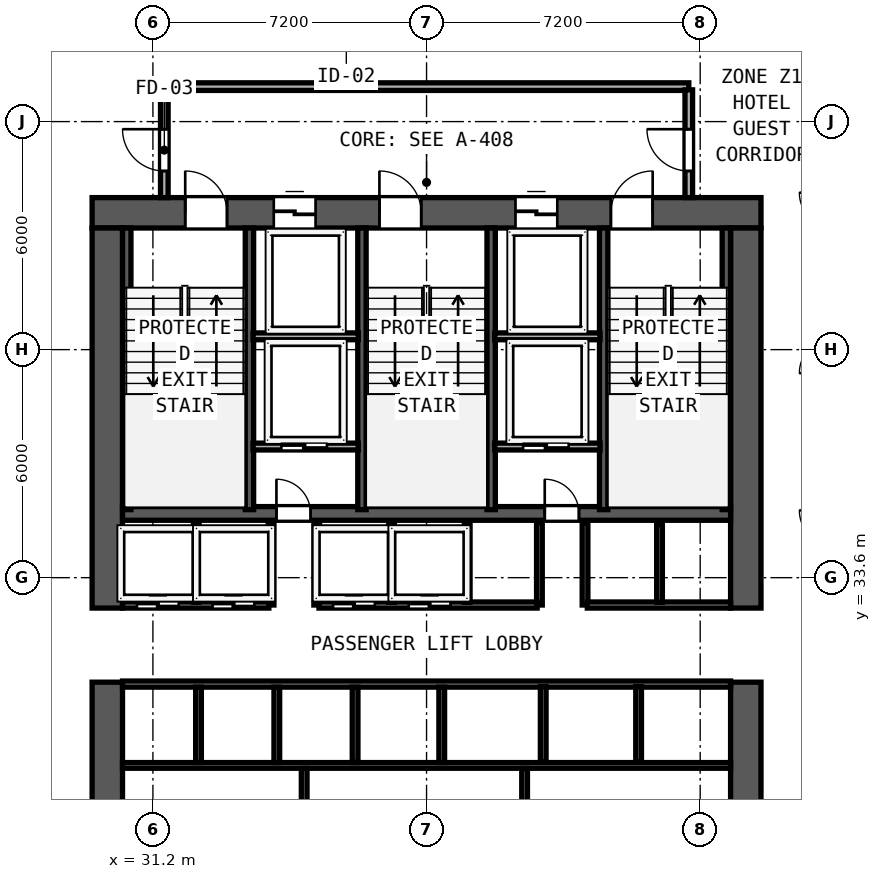
"""IFC4 building model, lengths in metres.
Left out: names, types, materials, properties, quantities, classifications, styles, units other than length and angle.
Written with IfcOpenShell. Run it as: python <this file> out.ifc"""

import sys

from ifc_helpers import new_model, si_unit, direction, frame, frame_2d, origin, place, context, subcontext, project, spatial, rectangle, extrude, element, fill, save


model = new_model("IFC4")
c1 = context("Model", 3, precision=1e-05, world=origin(), true_north=direction((0.0, 1.0)))
c2 = subcontext(c1, "Body", "Model", "MODEL_VIEW")
j1 = project(units=[si_unit("LENGTHUNIT", "METRE"), si_unit("PLANEANGLEUNIT", "RADIAN")], contexts=[c1])
p1 = place(None, origin())
s1 = spatial("IfcSite", under=j1, at=p1, CompositionType="ELEMENT")
p2 = place(p1, origin())
s2 = spatial("IfcBuilding", under=s1, at=p2, CompositionType="ELEMENT")
p3 = place(p2, frame((0.0, 0.0, 39.2)))
s3 = spatial("IfcBuildingStorey", under=s2, at=p3, CompositionType="ELEMENT", Elevation=39.2)
p4 = place(p3, frame((29.6, 43.2, 0.0), z_axis=(0.0, 0.0, 1.0), x_axis=(1.0, 0.0, 0.0)))
e1 = element("IfcWall", 1, at=p4, inside=s3, PredefinedType="SHEAR", context=c2, shape_type="SweptSolid", body=[
    extrude(rectangle(XDim=17.6, YDim=0.8, at=frame_2d((8.8, 0.0))), origin(), (0.0, 0.0, 1.0), 3.54),
])
p5 = place(p4, frame((2.45, 0.0, 0.0)))
e2 = element("IfcOpeningElement", 2, at=p5, cuts=e1, PredefinedType="OPENING", context=c2, shape_type="SweptSolid", body=[
    extrude(rectangle(XDim=1.1, YDim=2.15, at=frame_2d((0.55, 1.075))), frame((0.0, 0.41, 0.0), z_axis=(0.0, -1.0, 0.0), x_axis=(1.0, 0.0, 0.0)), (0.0, 0.0, 1.0), 0.82),
])
p6 = place(p4, frame((7.56, 0.0, 0.0)))
e3 = element("IfcOpeningElement", 3, at=p6, cuts=e1, PredefinedType="OPENING", context=c2, shape_type="SweptSolid", body=[
    extrude(rectangle(XDim=1.1, YDim=2.15, at=frame_2d((0.55, 1.075))), frame((0.0, 0.41, 0.0), z_axis=(0.0, -1.0, 0.0), x_axis=(1.0, 0.0, 0.0)), (0.0, 0.0, 1.0), 0.82),
])
p7 = place(p4, frame((13.65, 0.0, 0.0)))
e4 = element("IfcOpeningElement", 4, at=p7, cuts=e1, PredefinedType="OPENING", context=c2, shape_type="SweptSolid", body=[
    extrude(rectangle(XDim=1.1, YDim=2.15, at=frame_2d((0.55, 1.075))), frame((0.0, 0.41, 0.0), z_axis=(0.0, -1.0, 0.0), x_axis=(1.0, 0.0, 0.0)), (0.0, 0.0, 1.0), 0.82),
])
p8 = place(p4, frame((4.78, 0.0, 0.0)))
e5 = element("IfcOpeningElement", 5, at=p8, cuts=e1, PredefinedType="OPENING", context=c2, shape_type="SweptSolid", body=[
    extrude(rectangle(XDim=1.1, YDim=2.2, at=frame_2d((0.55, 1.1))), frame((0.0, 0.41, 0.0), z_axis=(0.0, -1.0, 0.0), x_axis=(1.0, 0.0, 0.0)), (0.0, 0.0, 1.0), 0.82),
])
p9 = place(p4, frame((11.14, 0.0, 0.0)))
e6 = element("IfcOpeningElement", 6, at=p9, cuts=e1, PredefinedType="OPENING", context=c2, shape_type="SweptSolid", body=[
    extrude(rectangle(XDim=1.1, YDim=2.2, at=frame_2d((0.55, 1.1))), frame((0.0, 0.41, 0.0), z_axis=(0.0, -1.0, 0.0), x_axis=(1.0, 0.0, 0.0)), (0.0, 0.0, 1.0), 0.82),
])
p10 = place(p3, frame((30.0, 26.8, 0.0), z_axis=(0.0, 0.0, 1.0), x_axis=(0.0, 1.0, 0.0)))
e7 = element("IfcWall", 7, at=p10, inside=s3, PredefinedType="SHEAR", context=c2, shape_type="SweptSolid", body=[
    extrude(rectangle(XDim=4.05, YDim=0.8, at=frame_2d((2.025, 0.0))), origin(), (0.0, 0.0, 1.0), 3.54),
])
p11 = place(p3, frame((30.0, 32.8, 0.0), z_axis=(0.0, 0.0, 1.0), x_axis=(0.0, 1.0, 0.0)))
e8 = element("IfcWall", 8, at=p11, inside=s3, PredefinedType="SHEAR", context=c2, shape_type="SweptSolid", body=[
    extrude(rectangle(XDim=10.0, YDim=0.8, at=frame_2d((5.0, 0.0))), origin(), (0.0, 0.0, 1.0), 3.54),
])
p12 = place(p3, frame((46.8, 26.8, 0.0), z_axis=(0.0, 0.0, 1.0), x_axis=(0.0, 1.0, 0.0)))
e9 = element("IfcWall", 9, at=p12, inside=s3, PredefinedType="SHEAR", context=c2, shape_type="SweptSolid", body=[
    extrude(rectangle(XDim=4.05, YDim=0.8, at=frame_2d((2.025, 0.0))), origin(), (0.0, 0.0, 1.0), 3.54),
])
p13 = place(p3, frame((46.8, 32.8, 0.0), z_axis=(0.0, 0.0, 1.0), x_axis=(0.0, 1.0, 0.0)))
e10 = element("IfcWall", 10, at=p13, inside=s3, PredefinedType="SHEAR", context=c2, shape_type="SweptSolid", body=[
    extrude(rectangle(XDim=10.0, YDim=0.8, at=frame_2d((5.0, 0.0))), origin(), (0.0, 0.0, 1.0), 3.54),
])
p14 = place(p3, frame((30.4, 35.29, 0.0), z_axis=(0.0, 0.0, 1.0), x_axis=(1.0, 0.0, 0.0)))
e11 = element("IfcWall", 11, at=p14, inside=s3, PredefinedType="SHEAR", context=c2, shape_type="SweptSolid", body=[
    extrude(rectangle(XDim=16.0, YDim=0.36, at=frame_2d((8.0, 0.0))), origin(), (0.0, 0.0, 1.0), 3.54),
])
p15 = place(p14, frame((4.95, 0.0, 0.0), z_axis=(0.0, 0.0, 1.0), x_axis=(-1.0, 0.0, 0.0)))
e12 = element("IfcOpeningElement", 12, at=p15, cuts=e11, PredefinedType="OPENING", context=c2, shape_type="SweptSolid", body=[
    extrude(rectangle(XDim=0.9, YDim=2.1, at=frame_2d((0.45, 1.05))), frame((0.0, 0.19, 0.0), z_axis=(0.0, -1.0, 0.0), x_axis=(1.0, 0.0, 0.0)), (0.0, 0.0, 1.0), 0.38),
])
p16 = place(p14, frame((12.01, 0.0, 0.0), z_axis=(0.0, 0.0, 1.0), x_axis=(-1.0, 0.0, 0.0)))
e13 = element("IfcOpeningElement", 13, at=p16, cuts=e11, PredefinedType="OPENING", context=c2, shape_type="SweptSolid", body=[
    extrude(rectangle(XDim=0.9, YDim=2.1, at=frame_2d((0.45, 1.05))), frame((0.0, 0.19, 0.0), z_axis=(0.0, -1.0, 0.0), x_axis=(1.0, 0.0, 0.0)), (0.0, 0.0, 1.0), 0.38),
])
for number, where, z_axis, x_axis in (
    (14, (30.512, 35.39, 0.0), (0.0, 0.0, 1.0), (0.0, 1.0, 0.0)),
    (15, (33.74, 35.39, 0.0), (0.0, 0.0, 1.0), (0.0, 1.0, 0.0)),
    (16, (36.7, 35.39, 0.0), (0.0, 0.0, 1.0), (0.0, 1.0, 0.0)),
    (17, (40.1, 35.39, 0.0), (0.0, 0.0, 1.0), (0.0, 1.0, 0.0)),
    (18, (43.06, 35.39, 0.0), (0.0, 0.0, 1.0), (0.0, 1.0, 0.0)),
    (19, (46.288, 35.39, 0.0), (0.0, 0.0, 1.0), (0.0, 1.0, 0.0)),
):
    element("IfcWall", number, at=place(p3, frame(where, z_axis=z_axis, x_axis=x_axis)), inside=s3, PredefinedType="SHEAR", context=c2, shape_type="SweptSolid", body=[
        extrude(rectangle(XDim=7.41, YDim=0.22, at=frame_2d((3.705, 0.0))), origin(), (0.0, 0.0, 1.0), 3.54),
    ])
p17 = place(p3, frame((31.5, 46.52, 0.0), z_axis=(0.0, 0.0, 1.0), x_axis=(1.0, 0.0, 0.0)))
e20 = element("IfcWall", 20, at=p17, inside=s3, PredefinedType="SOLIDWALL", context=c2, shape_type="SweptSolid", body=[
    extrude(rectangle(XDim=13.8, YDim=0.2, at=frame_2d((6.9, 0.0))), origin(), (0.0, 0.0, 1.0), 3.54),
])
p18 = place(p3, frame((31.5, 43.6, 0.0), z_axis=(0.0, 0.0, 1.0), x_axis=(0.0, 1.0, 0.0)))
e21 = element("IfcWall", 21, at=p18, inside=s3, PredefinedType="SOLIDWALL", context=c2, shape_type="SweptSolid", body=[
    extrude(rectangle(XDim=2.835, YDim=0.2, at=frame_2d((1.417, 0.0))), origin(), (0.0, 0.0, 1.0), 3.54),
])
p19 = place(p18, frame((1.8, 0.0, 0.0), z_axis=(0.0, 0.0, 1.0), x_axis=(-1.0, 0.0, 0.0)))
e22 = element("IfcOpeningElement", 22, at=p19, cuts=e21, PredefinedType="OPENING", context=c2, shape_type="SweptSolid", body=[
    extrude(rectangle(XDim=1.1, YDim=2.15, at=frame_2d((0.55, 1.075))), frame((0.0, 0.11, 0.0), z_axis=(0.0, -1.0, 0.0), x_axis=(1.0, 0.0, 0.0)), (0.0, 0.0, 1.0), 0.22),
])
p20 = place(p3, frame((45.3, 43.6, 0.0), z_axis=(0.0, 0.0, 1.0), x_axis=(0.0, 1.0, 0.0)))
e23 = element("IfcWall", 23, at=p20, inside=s3, PredefinedType="SOLIDWALL", context=c2, shape_type="SweptSolid", body=[
    extrude(rectangle(XDim=2.835, YDim=0.2, at=frame_2d((1.417, 0.0))), origin(), (0.0, 0.0, 1.0), 3.54),
])
p21 = place(p20, frame((0.7, 0.0, 0.0)))
e24 = element("IfcOpeningElement", 24, at=p21, cuts=e23, PredefinedType="OPENING", context=c2, shape_type="SweptSolid", body=[
    extrude(rectangle(XDim=1.1, YDim=2.15, at=frame_2d((0.55, 1.075))), frame((0.0, 0.11, 0.0), z_axis=(0.0, -1.0, 0.0), x_axis=(1.0, 0.0, 0.0)), (0.0, 0.0, 1.0), 0.22),
])
for number, where, z_axis, x_axis in (
    (25, (33.835, 39.95, 0.0), (0.0, 0.0, 1.0), (1.0, 0.0, 0.0)),
    (26, (40.195, 39.95, 0.0), (0.0, 0.0, 1.0), (1.0, 0.0, 0.0)),
):
    element("IfcWall", number, at=place(p3, frame(where, z_axis=z_axis, x_axis=x_axis)), inside=s3, PredefinedType="SOLIDWALL", context=c2, shape_type="SweptSolid", body=[
        extrude(rectangle(XDim=2.77, YDim=0.18, at=frame_2d((1.385, 0.0))), origin(), (0.0, 0.0, 1.0), 3.54),
    ])
p22 = place(p3, frame((33.835, 37.05, 0.0), z_axis=(0.0, 0.0, 1.0), x_axis=(1.0, 0.0, 0.0)))
e27 = element("IfcWall", 27, at=p22, inside=s3, PredefinedType="SOLIDWALL", context=c2, shape_type="SweptSolid", body=[
    extrude(rectangle(XDim=2.77, YDim=0.18, at=frame_2d((1.385, 0.0))), origin(), (0.0, 0.0, 1.0), 3.54),
])
p23 = place(p22, frame((1.945, 0.0, 0.0), z_axis=(0.0, 0.0, 1.0), x_axis=(-1.0, 0.0, 0.0)))
e28 = element("IfcOpeningElement", 28, at=p23, cuts=e27, PredefinedType="OPENING", context=c2, shape_type="SweptSolid", body=[
    extrude(rectangle(XDim=1.2, YDim=2.2, at=frame_2d((0.6, 1.1))), frame((0.0, 0.1, 0.0), z_axis=(0.0, -1.0, 0.0), x_axis=(1.0, 0.0, 0.0)), (0.0, 0.0, 1.0), 0.2),
])
for number, where, z_axis, x_axis in (
    (29, (34.31, 32.88, 0.0), (0.0, 0.0, 1.0), (0.0, 1.0, 0.0)),
    (30, (35.51, 32.88, 0.0), (0.0, 0.0, 1.0), (0.0, 1.0, 0.0)),
):
    element("IfcWall", number, at=place(p3, frame(where, z_axis=z_axis, x_axis=x_axis)), inside=s3, PredefinedType="SOLIDWALL", context=c2, shape_type="SweptSolid", body=[
        extrude(rectangle(XDim=2.17, YDim=0.15, at=frame_2d((1.085, 0.0))), origin(), (0.0, 0.0, 1.0), 3.54),
    ])
p24 = place(p3, frame((40.195, 37.05, 0.0), z_axis=(0.0, 0.0, 1.0), x_axis=(1.0, 0.0, 0.0)))
e31 = element("IfcWall", 31, at=p24, inside=s3, PredefinedType="SOLIDWALL", context=c2, shape_type="SweptSolid", body=[
    extrude(rectangle(XDim=2.77, YDim=0.18, at=frame_2d((1.385, 0.0))), origin(), (0.0, 0.0, 1.0), 3.54),
])
p25 = place(p24, frame((1.945, 0.0, 0.0), z_axis=(0.0, 0.0, 1.0), x_axis=(-1.0, 0.0, 0.0)))
e32 = element("IfcOpeningElement", 32, at=p25, cuts=e31, PredefinedType="OPENING", context=c2, shape_type="SweptSolid", body=[
    extrude(rectangle(XDim=1.2, YDim=2.2, at=frame_2d((0.6, 1.1))), frame((0.0, 0.1, 0.0), z_axis=(0.0, -1.0, 0.0), x_axis=(1.0, 0.0, 0.0)), (0.0, 0.0, 1.0), 0.2),
])
for number, where, z_axis, x_axis in (
    (33, (41.37, 32.88, 0.0), (0.0, 0.0, 1.0), (0.0, 1.0, 0.0)),
    (34, (42.57, 32.88, 0.0), (0.0, 0.0, 1.0), (0.0, 1.0, 0.0)),
):
    element("IfcWall", number, at=place(p3, frame(where, z_axis=z_axis, x_axis=x_axis)), inside=s3, PredefinedType="SOLIDWALL", context=c2, shape_type="SweptSolid", body=[
        extrude(rectangle(XDim=2.17, YDim=0.15, at=frame_2d((1.085, 0.0))), origin(), (0.0, 0.0, 1.0), 3.54),
    ])
p26 = place(p3, frame((30.4, 32.88, 0.0), z_axis=(0.0, 0.0, 1.0), x_axis=(1.0, 0.0, 0.0)))
e35 = element("IfcWall", 35, at=p26, inside=s3, PredefinedType="SOLIDWALL", context=c2, shape_type="SweptSolid", body=[
    extrude(rectangle(XDim=3.85, YDim=0.16, at=frame_2d((1.925, 0.0))), origin(), (0.0, 0.0, 1.0), 3.54),
])
p27 = place(p26, frame((1.48, 0.0, 0.0), z_axis=(0.0, 0.0, 1.0), x_axis=(-1.0, 0.0, 0.0)))
e36 = element("IfcOpeningElement", 36, at=p27, cuts=e35, PredefinedType="OPENING", context=c2, shape_type="SweptSolid", body=[
    extrude(rectangle(XDim=1.1, YDim=2.2, at=frame_2d((0.55, 1.1))), frame((0.0, 0.09, 0.0), z_axis=(0.0, -1.0, 0.0), x_axis=(1.0, 0.0, 0.0)), (0.0, 0.0, 1.0), 0.18),
])
p28 = place(p26, frame((3.47, 0.0, 0.0), z_axis=(0.0, 0.0, 1.0), x_axis=(-1.0, 0.0, 0.0)))
e37 = element("IfcOpeningElement", 37, at=p28, cuts=e35, PredefinedType="OPENING", context=c2, shape_type="SweptSolid", body=[
    extrude(rectangle(XDim=1.1, YDim=2.2, at=frame_2d((0.55, 1.1))), frame((0.0, 0.09, 0.0), z_axis=(0.0, -1.0, 0.0), x_axis=(1.0, 0.0, 0.0)), (0.0, 0.0, 1.0), 0.18),
])
p29 = place(p3, frame((35.57, 32.88, 0.0), z_axis=(0.0, 0.0, 1.0), x_axis=(1.0, 0.0, 0.0)))
e38 = element("IfcWall", 38, at=p29, inside=s3, PredefinedType="SOLIDWALL", context=c2, shape_type="SweptSolid", body=[
    extrude(rectangle(XDim=5.74, YDim=0.16, at=frame_2d((2.87, 0.0))), origin(), (0.0, 0.0, 1.0), 3.54),
])
p30 = place(p29, frame((1.47, 0.0, 0.0), z_axis=(0.0, 0.0, 1.0), x_axis=(-1.0, 0.0, 0.0)))
e39 = element("IfcOpeningElement", 39, at=p30, cuts=e38, PredefinedType="OPENING", context=c2, shape_type="SweptSolid", body=[
    extrude(rectangle(XDim=1.1, YDim=2.2, at=frame_2d((0.55, 1.1))), frame((0.0, 0.09, 0.0), z_axis=(0.0, -1.0, 0.0), x_axis=(1.0, 0.0, 0.0)), (0.0, 0.0, 1.0), 0.18),
])
p31 = place(p29, frame((3.46, 0.0, 0.0), z_axis=(0.0, 0.0, 1.0), x_axis=(-1.0, 0.0, 0.0)))
e40 = element("IfcOpeningElement", 40, at=p31, cuts=e38, PredefinedType="OPENING", context=c2, shape_type="SweptSolid", body=[
    extrude(rectangle(XDim=1.1, YDim=2.2, at=frame_2d((0.55, 1.1))), frame((0.0, 0.09, 0.0), z_axis=(0.0, -1.0, 0.0), x_axis=(1.0, 0.0, 0.0)), (0.0, 0.0, 1.0), 0.18),
])
p32 = place(p3, frame((42.63, 32.88, 0.0), z_axis=(0.0, 0.0, 1.0), x_axis=(1.0, 0.0, 0.0)))
e41 = element("IfcWall", 41, at=p32, inside=s3, PredefinedType="SOLIDWALL", context=c2, shape_type="SweptSolid", body=[
    extrude(rectangle(XDim=3.77, YDim=0.16, at=frame_2d((1.885, 0.0))), origin(), (0.0, 0.0, 1.0), 3.54),
])
for number, where, z_axis, x_axis in (
    (42, (32.34, 32.95, 0.0), (0.0, 0.0, 1.0), (0.0, 1.0, 0.0)),
    (43, (37.48, 32.95, 0.0), (0.0, 0.0, 1.0), (0.0, 1.0, 0.0)),
    (44, (39.47, 32.95, 0.0), (0.0, 0.0, 1.0), (0.0, 1.0, 0.0)),
    (45, (44.53, 32.95, 0.0), (0.0, 0.0, 1.0), (0.0, 1.0, 0.0)),
):
    element("IfcWall", number, at=place(p3, frame(where, z_axis=z_axis, x_axis=x_axis)), inside=s3, PredefinedType="SOLIDWALL", context=c2, shape_type="SweptSolid", body=[
        extrude(rectangle(XDim=2.05, YDim=0.15, at=frame_2d((1.025, 0.0))), origin(), (0.0, 0.0, 1.0), 3.54),
    ])
p33 = place(p3, frame((30.4, 30.8, 0.0), z_axis=(0.0, 0.0, 1.0), x_axis=(1.0, 0.0, 0.0)))
e46 = element("IfcWall", 46, at=p33, inside=s3, PredefinedType="SOLIDWALL", context=c2, shape_type="SweptSolid", body=[
    extrude(rectangle(XDim=16.0, YDim=0.16, at=frame_2d((8.0, 0.0))), origin(), (0.0, 0.0, 1.0), 3.54),
])
p34 = place(p3, frame((30.4, 28.66, 0.0), z_axis=(0.0, 0.0, 1.0), x_axis=(1.0, 0.0, 0.0)))
e47 = element("IfcWall", 47, at=p34, inside=s3, PredefinedType="PARTITIONING", context=c2, shape_type="SweptSolid", body=[
    extrude(rectangle(XDim=16.0, YDim=0.15, at=frame_2d((8.0, 0.0))), origin(), (0.0, 0.0, 1.0), 3.54),
])
for number, where, z_axis, x_axis in (
    (48, (32.4, 28.735, 0.0), (0.0, 0.0, 1.0), (0.0, 1.0, 0.0)),
    (49, (34.46, 28.735, 0.0), (0.0, 0.0, 1.0), (0.0, 1.0, 0.0)),
    (50, (36.52, 28.735, 0.0), (0.0, 0.0, 1.0), (0.0, 1.0, 0.0)),
    (51, (38.8, 28.735, 0.0), (0.0, 0.0, 1.0), (0.0, 1.0, 0.0)),
):
    element("IfcWall", number, at=place(p3, frame(where, z_axis=z_axis, x_axis=x_axis)), inside=s3, PredefinedType="SOLIDWALL", context=c2, shape_type="SweptSolid", body=[
        extrude(rectangle(XDim=1.985, YDim=0.15, at=frame_2d((0.992, 0.0))), origin(), (0.0, 0.0, 1.0), 3.54),
    ])
for number, where, z_axis, x_axis in (
    (52, (35.18, 26.81, 0.0), (0.0, 0.0, 1.0), (0.0, 1.0, 0.0)),
    (53, (40.98, 26.81, 0.0), (0.0, 0.0, 1.0), (0.0, 1.0, 0.0)),
):
    element("IfcWall", number, at=place(p3, frame(where, z_axis=z_axis, x_axis=x_axis)), inside=s3, PredefinedType="PARTITIONING", context=c2, shape_type="SweptSolid", body=[
        extrude(rectangle(XDim=1.77, YDim=0.15, at=frame_2d((0.885, 0.0))), origin(), (0.0, 0.0, 1.0), 3.54),
    ])
for number, where, z_axis, x_axis in (
    (54, (41.47, 28.75, 0.0), (0.0, 0.0, 1.0), (0.0, 1.0, 0.0)),
    (55, (43.98, 28.75, 0.0), (0.0, 0.0, 1.0), (0.0, 1.0, 0.0)),
):
    element("IfcWall", number, at=place(p3, frame(where, z_axis=z_axis, x_axis=x_axis)), inside=s3, PredefinedType="SOLIDWALL", context=c2, shape_type="SweptSolid", body=[
        extrude(rectangle(XDim=1.985, YDim=0.15, at=frame_2d((0.993, 0.0))), origin(), (0.0, 0.0, 1.0), 3.54),
    ])
p35 = place(p5, origin())
e56 = element("IfcDoor", 56, at=p35, inside=s3, OperationType="SINGLE_SWING_LEFT", PredefinedType="DOOR", context=c2, shape_type="SweptSolid", body=[
    extrude(rectangle(XDim=1.1, YDim=2.15, at=frame_2d((0.55, 1.075))), frame((0.0, 0.185, 0.0), z_axis=(0.0, -1.0, 0.0), x_axis=(1.0, 0.0, 0.0)), (0.0, 0.0, 1.0), 0.05),
])
fill(e2, e56)
p36 = place(p6, origin())
e57 = element("IfcDoor", 57, at=p36, inside=s3, OperationType="SINGLE_SWING_LEFT", PredefinedType="DOOR", context=c2, shape_type="SweptSolid", body=[
    extrude(rectangle(XDim=1.1, YDim=2.15, at=frame_2d((0.55, 1.075))), frame((0.0, 0.185, 0.0), z_axis=(0.0, -1.0, 0.0), x_axis=(1.0, 0.0, 0.0)), (0.0, 0.0, 1.0), 0.05),
])
fill(e3, e57)
p37 = place(p7, origin())
e58 = element("IfcDoor", 58, at=p37, inside=s3, OperationType="SINGLE_SWING_RIGHT", PredefinedType="DOOR", context=c2, shape_type="SweptSolid", body=[
    extrude(rectangle(XDim=1.1, YDim=2.15, at=frame_2d((0.55, 1.075))), frame((0.0, 0.185, 0.0), z_axis=(0.0, -1.0, 0.0), x_axis=(1.0, 0.0, 0.0)), (0.0, 0.0, 1.0), 0.05),
])
fill(e4, e58)
p38 = place(p19, origin())
e59 = element("IfcDoor", 59, at=p38, inside=s3, OperationType="SINGLE_SWING_LEFT", PredefinedType="DOOR", context=c2, shape_type="SweptSolid", body=[
    extrude(rectangle(XDim=1.1, YDim=2.15, at=frame_2d((0.55, 1.075))), frame((0.0, 0.025, 0.0), z_axis=(0.0, -1.0, 0.0), x_axis=(1.0, 0.0, 0.0)), (0.0, 0.0, 1.0), 0.05),
])
fill(e22, e59)
p39 = place(p21, origin())
e60 = element("IfcDoor", 60, at=p39, inside=s3, OperationType="SINGLE_SWING_RIGHT", PredefinedType="DOOR", context=c2, shape_type="SweptSolid", body=[
    extrude(rectangle(XDim=1.1, YDim=2.15, at=frame_2d((0.55, 1.075))), frame((0.0, 0.025, 0.0), z_axis=(0.0, -1.0, 0.0), x_axis=(1.0, 0.0, 0.0)), (0.0, 0.0, 1.0), 0.05),
])
fill(e24, e60)
p40 = place(p8, origin())
e61 = element("IfcDoor", 61, at=p40, inside=s3, OperationType="SLIDING_TO_LEFT", PredefinedType="DOOR", context=c2, shape_type="SweptSolid", body=[
    extrude(rectangle(XDim=1.1, YDim=2.2, at=frame_2d((0.55, 1.1))), frame((0.0, 0.185, 0.0), z_axis=(0.0, -1.0, 0.0), x_axis=(1.0, 0.0, 0.0)), (0.0, 0.0, 1.0), 0.05),
])
fill(e5, e61)
p41 = place(p9, origin())
e62 = element("IfcDoor", 62, at=p41, inside=s3, OperationType="SLIDING_TO_LEFT", PredefinedType="DOOR", context=c2, shape_type="SweptSolid", body=[
    extrude(rectangle(XDim=1.1, YDim=2.2, at=frame_2d((0.55, 1.1))), frame((0.0, 0.185, 0.0), z_axis=(0.0, -1.0, 0.0), x_axis=(1.0, 0.0, 0.0)), (0.0, 0.0, 1.0), 0.05),
])
fill(e6, e62)
p42 = place(p23, origin())
e63 = element("IfcDoor", 63, at=p42, inside=s3, OperationType="SLIDING_TO_RIGHT", PredefinedType="DOOR", context=c2, shape_type="SweptSolid", body=[
    extrude(rectangle(XDim=1.2, YDim=2.2, at=frame_2d((0.6, 1.1))), frame((0.0, 0.025, 0.0), z_axis=(0.0, -1.0, 0.0), x_axis=(1.0, 0.0, 0.0)), (0.0, 0.0, 1.0), 0.05),
])
fill(e28, e63)
p43 = place(p15, origin())
e64 = element("IfcDoor", 64, at=p43, inside=s3, OperationType="SINGLE_SWING_RIGHT", PredefinedType="DOOR", context=c2, shape_type="SweptSolid", body=[
    extrude(rectangle(XDim=0.9, YDim=2.1, at=frame_2d((0.45, 1.05))), frame((0.0, 0.025, 0.0), z_axis=(0.0, -1.0, 0.0), x_axis=(1.0, 0.0, 0.0)), (0.0, 0.0, 1.0), 0.05),
])
fill(e12, e64)
p44 = place(p25, origin())
e65 = element("IfcDoor", 65, at=p44, inside=s3, OperationType="SLIDING_TO_RIGHT", PredefinedType="DOOR", context=c2, shape_type="SweptSolid", body=[
    extrude(rectangle(XDim=1.2, YDim=2.2, at=frame_2d((0.6, 1.1))), frame((0.0, 0.025, 0.0), z_axis=(0.0, -1.0, 0.0), x_axis=(1.0, 0.0, 0.0)), (0.0, 0.0, 1.0), 0.05),
])
fill(e32, e65)
p45 = place(p16, origin())
e66 = element("IfcDoor", 66, at=p45, inside=s3, OperationType="SINGLE_SWING_RIGHT", PredefinedType="DOOR", context=c2, shape_type="SweptSolid", body=[
    extrude(rectangle(XDim=0.9, YDim=2.1, at=frame_2d((0.45, 1.05))), frame((0.0, 0.025, 0.0), z_axis=(0.0, -1.0, 0.0), x_axis=(1.0, 0.0, 0.0)), (0.0, 0.0, 1.0), 0.05),
])
fill(e13, e66)
p46 = place(p27, origin())
e67 = element("IfcDoor", 67, at=p46, inside=s3, OperationType="SLIDING_TO_LEFT", PredefinedType="DOOR", context=c2, shape_type="SweptSolid", body=[
    extrude(rectangle(XDim=1.1, YDim=2.2, at=frame_2d((0.55, 1.1))), frame((0.0, 0.025, 0.0), z_axis=(0.0, -1.0, 0.0), x_axis=(1.0, 0.0, 0.0)), (0.0, 0.0, 1.0), 0.05),
])
fill(e36, e67)
p47 = place(p28, origin())
e68 = element("IfcDoor", 68, at=p47, inside=s3, OperationType="SLIDING_TO_LEFT", PredefinedType="DOOR", context=c2, shape_type="SweptSolid", body=[
    extrude(rectangle(XDim=1.1, YDim=2.2, at=frame_2d((0.55, 1.1))), frame((0.0, 0.025, 0.0), z_axis=(0.0, -1.0, 0.0), x_axis=(1.0, 0.0, 0.0)), (0.0, 0.0, 1.0), 0.05),
])
fill(e37, e68)
p48 = place(p30, origin())
e69 = element("IfcDoor", 69, at=p48, inside=s3, OperationType="SLIDING_TO_LEFT", PredefinedType="DOOR", context=c2, shape_type="SweptSolid", body=[
    extrude(rectangle(XDim=1.1, YDim=2.2, at=frame_2d((0.55, 1.1))), frame((0.0, 0.025, 0.0), z_axis=(0.0, -1.0, 0.0), x_axis=(1.0, 0.0, 0.0)), (0.0, 0.0, 1.0), 0.05),
])
fill(e39, e69)
p49 = place(p31, origin())
e70 = element("IfcDoor", 70, at=p49, inside=s3, OperationType="SLIDING_TO_LEFT", PredefinedType="DOOR", context=c2, shape_type="SweptSolid", body=[
    extrude(rectangle(XDim=1.1, YDim=2.2, at=frame_2d((0.55, 1.1))), frame((0.0, 0.025, 0.0), z_axis=(0.0, -1.0, 0.0), x_axis=(1.0, 0.0, 0.0)), (0.0, 0.0, 1.0), 0.05),
])
fill(e40, e70)
save(model, sys.argv[1])
